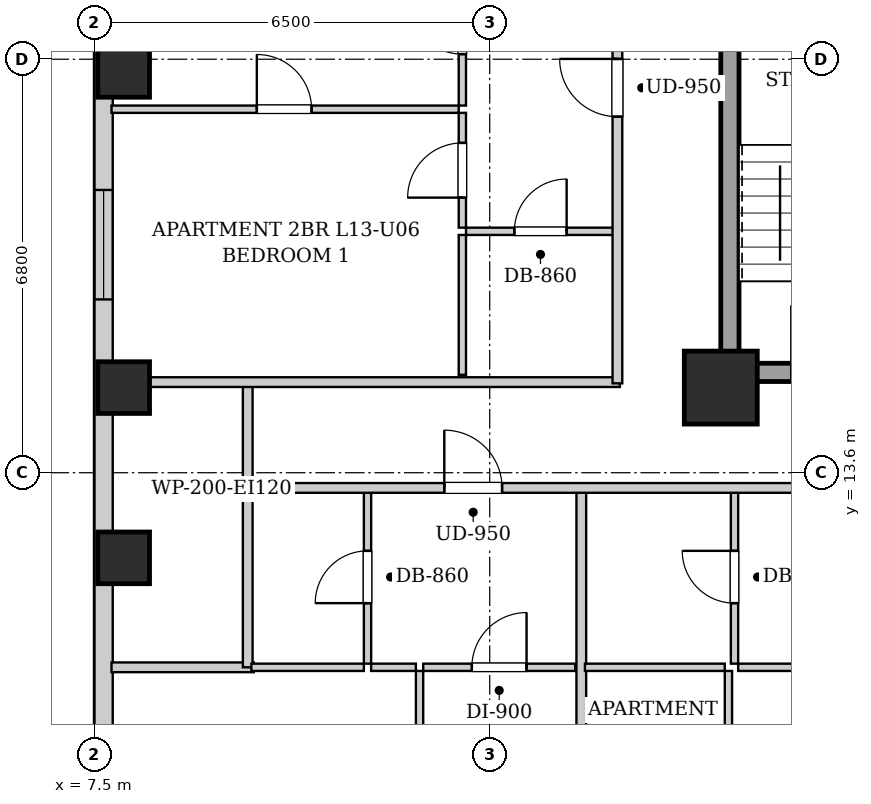
"""IFC4 building model, lengths in metres.
Left out: names, types, materials, properties, quantities, classifications, styles, units other than length and angle.
Written with IfcOpenShell. Run it as: python <this file> out.ifc"""

import sys

from ifc_helpers import new_model, si_unit, direction, frame, frame_2d, origin, origin_2d, place, context, subcontext, project, spatial, rectangle, extrude, element, fill, save


model = new_model("IFC4")
c1 = context("Model", 3, precision=1e-05, world=origin(), true_north=direction((0.0, 1.0)))
c2 = subcontext(c1, "Body", "Model", "MODEL_VIEW")
j1 = project(units=[si_unit("LENGTHUNIT", "METRE"), si_unit("PLANEANGLEUNIT", "RADIAN")], contexts=[c1])
p1 = place(None, origin())
s1 = spatial("IfcSite", under=j1, at=p1, CompositionType="ELEMENT")
p2 = place(p1, origin())
s2 = spatial("IfcBuilding", under=s1, at=p2, CompositionType="ELEMENT")
p3 = place(p2, frame((0.0, 0.0, 51.4)))
s3 = spatial("IfcBuildingStorey", under=s2, at=p3, CompositionType="ELEMENT", Elevation=51.4)
for number, where, z_axis, x_axis in (
    (1, (7.98, 12.2, 0.0), (0.0, 0.0, 1.0), (1.0, 0.0, 0.0)),
    (2, (7.98, 15.0, 0.0), (0.0, 0.0, 1.0), (1.0, 0.0, 0.0)),
    (3, (7.98, 20.2, 0.0), (0.0, 0.0, 1.0), (1.0, 0.0, 0.0)),
):
    element("IfcColumn", number, at=place(p3, frame(where, z_axis=z_axis, x_axis=x_axis)), inside=s3, PredefinedType="COLUMN", context=c2, shape_type="SweptSolid", body=[
        extrude(rectangle(XDim=0.85, YDim=0.85, at=origin_2d()), origin(), (0.0, 0.0, 1.0), 3.2),
    ])
p4 = place(p3, frame((17.8, 15.0, 0.0), z_axis=(0.0, 0.0, 1.0), x_axis=(1.0, 0.0, 0.0)))
e4 = element("IfcColumn", 4, at=p4, inside=s3, PredefinedType="COLUMN", context=c2, shape_type="SweptSolid", body=[
    extrude(rectangle(XDim=1.2, YDim=1.2, at=origin_2d()), origin(), (0.0, 0.0, 1.0), 3.2),
])
p5 = place(p3, frame((7.65, 2.5, 0.0), z_axis=(0.0, 0.0, 1.0), x_axis=(0.0, 1.0, 0.0)))
e5 = element("IfcWall", 5, at=p5, inside=s3, PredefinedType="SOLIDWALL", context=c2, shape_type="SweptSolid", body=[
    extrude(rectangle(XDim=42.6, YDim=0.3, at=frame_2d((21.3, 0.0))), origin(), (0.0, 0.0, 1.0), 1.975),
])
p6 = place(p5, frame((3.15, 0.0, 0.55)))
e6 = element("IfcOpeningElement", 6, at=p6, cuts=e5, PredefinedType="OPENING", context=c2, shape_type="SweptSolid", body=[
    extrude(rectangle(XDim=1.8, YDim=1.2, at=frame_2d((0.9, 0.6))), frame((0.0, 0.16, 0.0), z_axis=(0.0, -1.0, 0.0), x_axis=(1.0, 0.0, 0.0)), (0.0, 0.0, 1.0), 0.32),
])
p7 = place(p5, frame((1.185, 0.0, 0.55)))
e7 = element("IfcOpeningElement", 7, at=p7, cuts=e5, PredefinedType="OPENING", context=c2, shape_type="SweptSolid", body=[
    extrude(rectangle(XDim=1.35, YDim=1.2, at=frame_2d((0.675, 0.6))), frame((0.0, 0.16, 0.0), z_axis=(0.0, -1.0, 0.0), x_axis=(1.0, 0.0, 0.0)), (0.0, 0.0, 1.0), 0.32),
])
p8 = place(p5, frame((37.085, 0.0, 0.55)))
e8 = element("IfcOpeningElement", 8, at=p8, cuts=e5, PredefinedType="OPENING", context=c2, shape_type="SweptSolid", body=[
    extrude(rectangle(XDim=1.8, YDim=1.2, at=frame_2d((0.9, 0.6))), frame((0.0, 0.16, 0.0), z_axis=(0.0, -1.0, 0.0), x_axis=(1.0, 0.0, 0.0)), (0.0, 0.0, 1.0), 0.32),
])
p9 = place(p5, frame((31.55, 0.0, 0.55)))
e9 = element("IfcOpeningElement", 9, at=p9, cuts=e5, PredefinedType="OPENING", context=c2, shape_type="SweptSolid", body=[
    extrude(rectangle(XDim=1.35, YDim=1.2, at=frame_2d((0.675, 0.6))), frame((0.0, 0.16, 0.0), z_axis=(0.0, -1.0, 0.0), x_axis=(1.0, 0.0, 0.0)), (0.0, 0.0, 1.0), 0.32),
])
p10 = place(p5, frame((13.95, 0.0, 0.55)))
e10 = element("IfcOpeningElement", 10, at=p10, cuts=e5, PredefinedType="OPENING", context=c2, shape_type="SweptSolid", body=[
    extrude(rectangle(XDim=1.8, YDim=1.2, at=frame_2d((0.9, 0.6))), frame((0.0, 0.16, 0.0), z_axis=(0.0, -1.0, 0.0), x_axis=(1.0, 0.0, 0.0)), (0.0, 0.0, 1.0), 0.32),
])
p11 = place(p5, frame((23.325, 0.0, 0.55)))
e11 = element("IfcOpeningElement", 11, at=p11, cuts=e5, PredefinedType="OPENING", context=c2, shape_type="SweptSolid", body=[
    extrude(rectangle(XDim=1.8, YDim=1.2, at=frame_2d((0.9, 0.6))), frame((0.0, 0.16, 0.0), z_axis=(0.0, -1.0, 0.0), x_axis=(1.0, 0.0, 0.0)), (0.0, 0.0, 1.0), 0.32),
])
p12 = place(p3, frame((17.95, 15.1, 0.0), z_axis=(0.0, 0.0, 1.0), x_axis=(0.0, 1.0, 0.0)))
e12 = element("IfcWall", 12, at=p12, inside=s3, PredefinedType="SHEAR", context=c2, shape_type="SweptSolid", body=[
    extrude(rectangle(XDim=9.0, YDim=0.3, at=frame_2d((4.5, 0.0))), origin(), (0.0, 0.0, 1.0), 2.94),
])
p13 = place(p3, frame((18.1, 15.25, 0.0), z_axis=(0.0, 0.0, 1.0), x_axis=(1.0, 0.0, 0.0)))
e13 = element("IfcWall", 13, at=p13, inside=s3, PredefinedType="SHEAR", context=c2, shape_type="SweptSolid", body=[
    extrude(rectangle(XDim=2.85, YDim=0.3, at=frame_2d((1.425, 0.0))), origin(), (0.0, 0.0, 1.0), 2.94),
])
p14 = place(p13, frame((0.86, 0.0, 0.0)))
e14 = element("IfcOpeningElement", 14, at=p14, cuts=e13, PredefinedType="OPENING", context=c2, shape_type="SweptSolid", body=[
    extrude(rectangle(XDim=1.1, YDim=2.05, at=frame_2d((0.55, 1.025))), frame((0.0, 0.16, 0.0), z_axis=(0.0, -1.0, 0.0), x_axis=(1.0, 0.0, 0.0)), (0.0, 0.0, 1.0), 0.32),
])
p15 = place(p3, frame((10.02, 13.35, 0.0), z_axis=(0.0, 0.0, 1.0), x_axis=(0.0, 1.0, 0.0)))
e15 = element("IfcWall", 15, at=p15, inside=s3, PredefinedType="PARTITIONING", context=c2, shape_type="SweptSolid", body=[
    extrude(rectangle(XDim=1.74, YDim=0.16, at=frame_2d((0.87, 0.0))), origin(), (0.0, 0.0, 1.0), 2.94),
])
p16 = place(p3, frame((7.78, 15.09, 0.0), z_axis=(0.0, 0.0, 1.0), x_axis=(1.0, 0.0, 0.0)))
e16 = element("IfcWall", 16, at=p16, inside=s3, PredefinedType="PARTITIONING", context=c2, shape_type="SweptSolid", body=[
    extrude(rectangle(XDim=8.36, YDim=0.16, at=frame_2d((4.18, 0.0))), origin(), (0.0, 0.0, 1.0), 2.232),
])
p17 = place(p3, frame((7.78, 10.4, 0.0), z_axis=(0.0, 0.0, 1.0), x_axis=(1.0, 0.0, 0.0)))
e17 = element("IfcWall", 17, at=p17, inside=s3, PredefinedType="PARTITIONING", context=c2, shape_type="SweptSolid", body=[
    extrude(rectangle(XDim=2.34, YDim=0.16, at=frame_2d((1.17, 0.0))), origin(), (0.0, 0.0, 1.0), 2.94),
])
p18 = place(p3, frame((10.02, 10.4, 0.0), z_axis=(0.0, 0.0, 1.0), x_axis=(0.0, 1.0, 0.0)))
e18 = element("IfcWall", 18, at=p18, inside=s3, PredefinedType="PARTITIONING", context=c2, shape_type="SweptSolid", body=[
    extrude(rectangle(XDim=2.91, YDim=0.16, at=frame_2d((1.455, 0.0))), origin(), (0.0, 0.0, 1.0), 2.94),
])
p19 = place(p3, frame((11.99, 10.46, 0.0), z_axis=(0.0, 0.0, 1.0), x_axis=(0.0, 1.0, 0.0)))
e19 = element("IfcWall", 19, at=p19, inside=s3, PredefinedType="PARTITIONING", context=c2, shape_type="SweptSolid", body=[
    extrude(rectangle(XDim=2.85, YDim=0.12, at=frame_2d((1.425, 0.0))), origin(), (0.0, 0.0, 1.0), 2.94),
])
p20 = place(p19, frame((0.995, 0.0, 0.0)))
e20 = element("IfcOpeningElement", 20, at=p20, cuts=e19, PredefinedType="OPENING", context=c2, shape_type="SweptSolid", body=[
    extrude(rectangle(XDim=0.86, YDim=2.05, at=frame_2d((0.43, 1.025))), frame((0.0, 0.07, 0.0), z_axis=(0.0, -1.0, 0.0), x_axis=(1.0, 0.0, 0.0)), (0.0, 0.0, 1.0), 0.14),
])
p21 = place(p3, frame((10.08, 10.4, 0.0), z_axis=(0.0, 0.0, 1.0), x_axis=(1.0, 0.0, 0.0)))
e21 = element("IfcWall", 21, at=p21, inside=s3, PredefinedType="PARTITIONING", context=c2, shape_type="SweptSolid", body=[
    extrude(rectangle(XDim=1.85, YDim=0.12, at=frame_2d((0.925, 0.0))), origin(), (0.0, 0.0, 1.0), 2.94),
])
p22 = place(p3, frame((12.05, 10.4, 0.0), z_axis=(0.0, 0.0, 1.0), x_axis=(1.0, 0.0, 0.0)))
e22 = element("IfcWall", 22, at=p22, inside=s3, PredefinedType="PARTITIONING", context=c2, shape_type="SweptSolid", body=[
    extrude(rectangle(XDim=0.736, YDim=0.12, at=frame_2d((0.368, 0.0))), origin(), (0.0, 0.0, 1.0), 2.94),
])
p23 = place(p3, frame((12.906, 10.4, 0.0), z_axis=(0.0, 0.0, 1.0), x_axis=(1.0, 0.0, 0.0)))
e23 = element("IfcWall", 23, at=p23, inside=s3, PredefinedType="PARTITIONING", context=c2, shape_type="SweptSolid", body=[
    extrude(rectangle(XDim=2.5, YDim=0.12, at=frame_2d((1.25, 0.0))), origin(), (0.0, 0.0, 1.0), 2.94),
])
p24 = place(p23, frame((0.8, 0.0, 0.0)))
e24 = element("IfcOpeningElement", 24, at=p24, cuts=e23, PredefinedType="OPENING", context=c2, shape_type="SweptSolid", body=[
    extrude(rectangle(XDim=0.9, YDim=2.05, at=frame_2d((0.45, 1.025))), frame((0.0, 0.07, 0.0), z_axis=(0.0, -1.0, 0.0), x_axis=(1.0, 0.0, 0.0)), (0.0, 0.0, 1.0), 0.14),
])
p25 = place(p3, frame((12.846, 0.28, 0.0), z_axis=(0.0, 0.0, 1.0), x_axis=(0.0, 1.0, 0.0)))
e25 = element("IfcWall", 25, at=p25, inside=s3, PredefinedType="PARTITIONING", context=c2, shape_type="SweptSolid", body=[
    extrude(rectangle(XDim=10.06, YDim=0.12, at=frame_2d((5.03, 0.0))), origin(), (0.0, 0.0, 1.0), 2.94),
])
p26 = place(p25, frame((4.565, 0.0, 0.0)))
e26 = element("IfcOpeningElement", 26, at=p26, cuts=e25, PredefinedType="OPENING", context=c2, shape_type="SweptSolid", body=[
    extrude(rectangle(XDim=0.9, YDim=2.05, at=frame_2d((0.45, 1.025))), frame((0.0, 0.07, 0.0), z_axis=(0.0, -1.0, 0.0), x_axis=(1.0, 0.0, 0.0)), (0.0, 0.0, 1.0), 0.14),
])
p27 = place(p3, frame((15.506, 2.26, 0.0), z_axis=(0.0, 0.0, 1.0), x_axis=(0.0, 1.0, 0.0)))
e27 = element("IfcWall", 27, at=p27, inside=s3, PredefinedType="PARTITIONING", context=c2, shape_type="SweptSolid", body=[
    extrude(rectangle(XDim=11.05, YDim=0.16, at=frame_2d((5.525, 0.0))), origin(), (0.0, 0.0, 1.0), 2.94),
])
p28 = place(p3, frame((18.026, 10.46, 0.0), z_axis=(0.0, 0.0, 1.0), x_axis=(0.0, 1.0, 0.0)))
e28 = element("IfcWall", 28, at=p28, inside=s3, PredefinedType="PARTITIONING", context=c2, shape_type="SweptSolid", body=[
    extrude(rectangle(XDim=2.85, YDim=0.12, at=frame_2d((1.425, 0.0))), origin(), (0.0, 0.0, 1.0), 2.94),
])
p29 = place(p28, frame((0.995, 0.0, 0.0)))
e29 = element("IfcOpeningElement", 29, at=p29, cuts=e28, PredefinedType="OPENING", context=c2, shape_type="SweptSolid", body=[
    extrude(rectangle(XDim=0.86, YDim=2.05, at=frame_2d((0.43, 1.025))), frame((0.0, 0.07, 0.0), z_axis=(0.0, -1.0, 0.0), x_axis=(1.0, 0.0, 0.0)), (0.0, 0.0, 1.0), 0.14),
])
p30 = place(p3, frame((15.566, 10.4, 0.0), z_axis=(0.0, 0.0, 1.0), x_axis=(1.0, 0.0, 0.0)))
e30 = element("IfcWall", 30, at=p30, inside=s3, PredefinedType="PARTITIONING", context=c2, shape_type="SweptSolid", body=[
    extrude(rectangle(XDim=2.3, YDim=0.12, at=frame_2d((1.15, 0.0))), origin(), (0.0, 0.0, 1.0), 2.94),
])
p31 = place(p3, frame((18.086, 10.4, 0.0), z_axis=(0.0, 0.0, 1.0), x_axis=(1.0, 0.0, 0.0)))
e31 = element("IfcWall", 31, at=p31, inside=s3, PredefinedType="PARTITIONING", context=c2, shape_type="SweptSolid", body=[
    extrude(rectangle(XDim=4.44, YDim=0.12, at=frame_2d((2.22, 0.0))), origin(), (0.0, 0.0, 1.0), 2.94),
])
p32 = place(p31, frame((1.77, 0.0, 0.0)))
e32 = element("IfcOpeningElement", 32, at=p32, cuts=e31, PredefinedType="OPENING", context=c2, shape_type="SweptSolid", body=[
    extrude(rectangle(XDim=0.9, YDim=2.05, at=frame_2d((0.45, 1.025))), frame((0.0, 0.07, 0.0), z_axis=(0.0, -1.0, 0.0), x_axis=(1.0, 0.0, 0.0)), (0.0, 0.0, 1.0), 0.14),
])
p33 = place(p3, frame((17.926, 2.43, 0.0), z_axis=(0.0, 0.0, 1.0), x_axis=(0.0, 1.0, 0.0)))
e33 = element("IfcWall", 33, at=p33, inside=s3, PredefinedType="PARTITIONING", context=c2, shape_type="SweptSolid", body=[
    extrude(rectangle(XDim=7.91, YDim=0.12, at=frame_2d((3.955, 0.0))), origin(), (0.0, 0.0, 1.0), 2.232),
])
p34 = place(p33, frame((3.505, 0.0, 0.0)))
e34 = element("IfcOpeningElement", 34, at=p34, cuts=e33, PredefinedType="OPENING", context=c2, shape_type="SweptSolid", body=[
    extrude(rectangle(XDim=0.9, YDim=2.05, at=frame_2d((0.45, 1.025))), frame((0.0, 0.07, 0.0), z_axis=(0.0, -1.0, 0.0), x_axis=(1.0, 0.0, 0.0)), (0.0, 0.0, 1.0), 0.14),
])
p35 = place(p3, frame((13.61, 17.57, 0.0), z_axis=(0.0, 0.0, 1.0), x_axis=(1.0, 0.0, 0.0)))
e35 = element("IfcWall", 35, at=p35, inside=s3, PredefinedType="PARTITIONING", context=c2, shape_type="SweptSolid", body=[
    extrude(rectangle(XDim=2.45, YDim=0.12, at=frame_2d((1.225, 0.0))), origin(), (0.0, 0.0, 1.0), 2.94),
])
p36 = place(p35, frame((0.795, 0.0, 0.0)))
e36 = element("IfcOpeningElement", 36, at=p36, cuts=e35, PredefinedType="OPENING", context=c2, shape_type="SweptSolid", body=[
    extrude(rectangle(XDim=0.86, YDim=2.05, at=frame_2d((0.43, 1.025))), frame((0.0, 0.07, 0.0), z_axis=(0.0, -1.0, 0.0), x_axis=(1.0, 0.0, 0.0)), (0.0, 0.0, 1.0), 0.14),
])
p37 = place(p3, frame((13.55, 15.21, 0.0), z_axis=(0.0, 0.0, 1.0), x_axis=(0.0, 1.0, 0.0)))
e37 = element("IfcWall", 37, at=p37, inside=s3, PredefinedType="PARTITIONING", context=c2, shape_type="SweptSolid", body=[
    extrude(rectangle(XDim=2.3, YDim=0.12, at=frame_2d((1.15, 0.0))), origin(), (0.0, 0.0, 1.0), 2.94),
])
p38 = place(p3, frame((13.55, 17.63, 0.0), z_axis=(0.0, 0.0, 1.0), x_axis=(0.0, 1.0, 0.0)))
e38 = element("IfcWall", 38, at=p38, inside=s3, PredefinedType="PARTITIONING", context=c2, shape_type="SweptSolid", body=[
    extrude(rectangle(XDim=1.888, YDim=0.12, at=frame_2d((0.944, 0.0))), origin(), (0.0, 0.0, 1.0), 2.94),
])
p39 = place(p38, frame((0.494, 0.0, 0.0)))
e39 = element("IfcOpeningElement", 39, at=p39, cuts=e38, PredefinedType="OPENING", context=c2, shape_type="SweptSolid", body=[
    extrude(rectangle(XDim=0.9, YDim=2.05, at=frame_2d((0.45, 1.025))), frame((0.0, 0.07, 0.0), z_axis=(0.0, -1.0, 0.0), x_axis=(1.0, 0.0, 0.0)), (0.0, 0.0, 1.0), 0.14),
])
p40 = place(p3, frame((13.55, 19.638, 0.0), z_axis=(0.0, 0.0, 1.0), x_axis=(0.0, 1.0, 0.0)))
e40 = element("IfcWall", 40, at=p40, inside=s3, PredefinedType="PARTITIONING", context=c2, shape_type="SweptSolid", body=[
    extrude(rectangle(XDim=2.592, YDim=0.12, at=frame_2d((1.296, 0.0))), origin(), (0.0, 0.0, 1.0), 2.94),
])
p41 = place(p40, frame((0.846, 0.0, 0.0)))
e41 = element("IfcOpeningElement", 41, at=p41, cuts=e40, PredefinedType="OPENING", context=c2, shape_type="SweptSolid", body=[
    extrude(rectangle(XDim=0.9, YDim=2.05, at=frame_2d((0.45, 1.025))), frame((0.0, 0.07, 0.0), z_axis=(0.0, -1.0, 0.0), x_axis=(1.0, 0.0, 0.0)), (0.0, 0.0, 1.0), 0.14),
])
p42 = place(p3, frame((7.78, 19.578, 0.0), z_axis=(0.0, 0.0, 1.0), x_axis=(1.0, 0.0, 0.0)))
e42 = element("IfcWall", 42, at=p42, inside=s3, PredefinedType="PARTITIONING", context=c2, shape_type="SweptSolid", body=[
    extrude(rectangle(XDim=5.71, YDim=0.12, at=frame_2d((2.855, 0.0))), origin(), (0.0, 0.0, 1.0), 2.94),
])
p43 = place(p42, frame((2.39, 0.0, 0.0)))
e43 = element("IfcOpeningElement", 43, at=p43, cuts=e42, PredefinedType="OPENING", context=c2, shape_type="SweptSolid", body=[
    extrude(rectangle(XDim=0.9, YDim=2.05, at=frame_2d((0.45, 1.025))), frame((0.0, 0.07, 0.0), z_axis=(0.0, -1.0, 0.0), x_axis=(1.0, 0.0, 0.0)), (0.0, 0.0, 1.0), 0.14),
])
p44 = place(p3, frame((10.05, 13.35, 0.0), z_axis=(0.0, 0.0, 1.0), x_axis=(1.0, 0.0, 0.0)))
e44 = element("IfcWall", 44, at=p44, inside=s3, PredefinedType="PARTITIONING", context=c2, shape_type="SweptSolid", body=[
    extrude(rectangle(XDim=33.9, YDim=0.16, at=frame_2d((16.95, 0.0))), origin(), (0.0, 0.0, 1.0), 2.94),
])
p45 = place(p44, frame((3.203, 0.0, 0.0)))
e45 = element("IfcOpeningElement", 45, at=p45, cuts=e44, PredefinedType="OPENING", context=c2, shape_type="SweptSolid", body=[
    extrude(rectangle(XDim=0.95, YDim=2.1, at=frame_2d((0.475, 1.05))), frame((0.0, 0.09, 0.0), z_axis=(0.0, -1.0, 0.0), x_axis=(1.0, 0.0, 0.0)), (0.0, 0.0, 1.0), 0.18),
])
p46 = place(p44, frame((9.39, 0.0, 0.0)))
e46 = element("IfcOpeningElement", 46, at=p46, cuts=e44, PredefinedType="OPENING", context=c2, shape_type="SweptSolid", body=[
    extrude(rectangle(XDim=0.95, YDim=2.1, at=frame_2d((0.475, 1.05))), frame((0.0, 0.09, 0.0), z_axis=(0.0, -1.0, 0.0), x_axis=(1.0, 0.0, 0.0)), (0.0, 0.0, 1.0), 0.18),
])
p47 = place(p44, frame((28.476, 0.0, 0.0)))
e47 = element("IfcOpeningElement", 47, at=p47, cuts=e44, PredefinedType="OPENING", context=c2, shape_type="SweptSolid", body=[
    extrude(rectangle(XDim=0.95, YDim=2.1, at=frame_2d((0.475, 1.05))), frame((0.0, 0.09, 0.0), z_axis=(0.0, -1.0, 0.0), x_axis=(1.0, 0.0, 0.0)), (0.0, 0.0, 1.0), 0.18),
])
p48 = place(p3, frame((16.1, 15.07, 0.0), z_axis=(0.0, 0.0, 1.0), x_axis=(0.0, 1.0, 0.0)))
e48 = element("IfcWall", 48, at=p48, inside=s3, PredefinedType="PARTITIONING", context=c2, shape_type="SweptSolid", body=[
    extrude(rectangle(XDim=13.93, YDim=0.16, at=frame_2d((6.965, 0.0))), origin(), (0.0, 0.0, 1.0), 2.94),
])
p49 = place(p48, frame((4.385, 0.0, 0.0)))
e49 = element("IfcOpeningElement", 49, at=p49, cuts=e48, PredefinedType="OPENING", context=c2, shape_type="SweptSolid", body=[
    extrude(rectangle(XDim=0.95, YDim=2.1, at=frame_2d((0.475, 1.05))), frame((0.0, 0.09, 0.0), z_axis=(0.0, -1.0, 0.0), x_axis=(1.0, 0.0, 0.0)), (0.0, 0.0, 1.0), 0.18),
])
p50 = place(p14, origin())
e50 = element("IfcDoor", 50, at=p50, inside=s3, OperationType="SINGLE_SWING_LEFT", PredefinedType="DOOR", context=c2, shape_type="SweptSolid", body=[
    extrude(rectangle(XDim=1.1, YDim=2.05, at=frame_2d((0.55, 1.025))), frame((0.0, 0.025, 0.0), z_axis=(0.0, -1.0, 0.0), x_axis=(1.0, 0.0, 0.0)), (0.0, 0.0, 1.0), 0.05),
])
fill(e14, e50)
p51 = place(p20, origin())
e51 = element("IfcDoor", 51, at=p51, inside=s3, OperationType="SINGLE_SWING_LEFT", PredefinedType="DOOR", context=c2, shape_type="SweptSolid", body=[
    extrude(rectangle(XDim=0.86, YDim=2.05, at=frame_2d((0.43, 1.025))), frame((0.0, 0.025, 0.0), z_axis=(0.0, -1.0, 0.0), x_axis=(1.0, 0.0, 0.0)), (0.0, 0.0, 1.0), 0.05),
])
fill(e20, e51)
p52 = place(p24, origin())
e52 = element("IfcDoor", 52, at=p52, inside=s3, OperationType="SINGLE_SWING_RIGHT", PredefinedType="DOOR", context=c2, shape_type="SweptSolid", body=[
    extrude(rectangle(XDim=0.9, YDim=2.05, at=frame_2d((0.45, 1.025))), frame((0.0, 0.025, 0.0), z_axis=(0.0, -1.0, 0.0), x_axis=(1.0, 0.0, 0.0)), (0.0, 0.0, 1.0), 0.05),
])
fill(e24, e52)
p53 = place(p29, origin())
e53 = element("IfcDoor", 53, at=p53, inside=s3, OperationType="SINGLE_SWING_RIGHT", PredefinedType="DOOR", context=c2, shape_type="SweptSolid", body=[
    extrude(rectangle(XDim=0.86, YDim=2.05, at=frame_2d((0.43, 1.025))), frame((0.0, 0.025, 0.0), z_axis=(0.0, -1.0, 0.0), x_axis=(1.0, 0.0, 0.0)), (0.0, 0.0, 1.0), 0.05),
])
fill(e29, e53)
p54 = place(p36, origin())
e54 = element("IfcDoor", 54, at=p54, inside=s3, OperationType="SINGLE_SWING_RIGHT", PredefinedType="DOOR", context=c2, shape_type="SweptSolid", body=[
    extrude(rectangle(XDim=0.86, YDim=2.05, at=frame_2d((0.43, 1.025))), frame((0.0, 0.025, 0.0), z_axis=(0.0, -1.0, 0.0), x_axis=(1.0, 0.0, 0.0)), (0.0, 0.0, 1.0), 0.05),
])
fill(e36, e54)
p55 = place(p39, origin())
e55 = element("IfcDoor", 55, at=p55, inside=s3, OperationType="SINGLE_SWING_LEFT", PredefinedType="DOOR", context=c2, shape_type="SweptSolid", body=[
    extrude(rectangle(XDim=0.9, YDim=2.05, at=frame_2d((0.45, 1.025))), frame((0.0, 0.025, 0.0), z_axis=(0.0, -1.0, 0.0), x_axis=(1.0, 0.0, 0.0)), (0.0, 0.0, 1.0), 0.05),
])
fill(e39, e55)
p56 = place(p41, origin())
e56 = element("IfcDoor", 56, at=p56, inside=s3, OperationType="SINGLE_SWING_RIGHT", PredefinedType="DOOR", context=c2, shape_type="SweptSolid", body=[
    extrude(rectangle(XDim=0.9, YDim=2.05, at=frame_2d((0.45, 1.025))), frame((0.0, 0.025, 0.0), z_axis=(0.0, -1.0, 0.0), x_axis=(1.0, 0.0, 0.0)), (0.0, 0.0, 1.0), 0.05),
])
fill(e41, e56)
p57 = place(p43, origin())
e57 = element("IfcDoor", 57, at=p57, inside=s3, OperationType="SINGLE_SWING_LEFT", PredefinedType="DOOR", context=c2, shape_type="SweptSolid", body=[
    extrude(rectangle(XDim=0.9, YDim=2.05, at=frame_2d((0.45, 1.025))), frame((0.0, 0.025, 0.0), z_axis=(0.0, -1.0, 0.0), x_axis=(1.0, 0.0, 0.0)), (0.0, 0.0, 1.0), 0.05),
])
fill(e43, e57)
p58 = place(p45, origin())
e58 = element("IfcDoor", 58, at=p58, inside=s3, OperationType="SINGLE_SWING_LEFT", PredefinedType="DOOR", context=c2, shape_type="SweptSolid", body=[
    extrude(rectangle(XDim=0.95, YDim=2.1, at=frame_2d((0.475, 1.05))), frame((0.0, 0.025, 0.0), z_axis=(0.0, -1.0, 0.0), x_axis=(1.0, 0.0, 0.0)), (0.0, 0.0, 1.0), 0.05),
])
fill(e45, e58)
p59 = place(p49, origin())
e59 = element("IfcDoor", 59, at=p59, inside=s3, OperationType="SINGLE_SWING_RIGHT", PredefinedType="DOOR", context=c2, shape_type="SweptSolid", body=[
    extrude(rectangle(XDim=0.95, YDim=2.1, at=frame_2d((0.475, 1.05))), frame((0.0, 0.025, 0.0), z_axis=(0.0, -1.0, 0.0), x_axis=(1.0, 0.0, 0.0)), (0.0, 0.0, 1.0), 0.05),
])
fill(e49, e59)
p60 = place(p10, origin())
e60 = element("IfcWindow", 60, at=p60, inside=s3, PartitioningType="DOUBLE_PANEL_VERTICAL", PredefinedType="WINDOW", context=c2, shape_type="SweptSolid", body=[
    extrude(rectangle(XDim=1.8, YDim=1.2, at=frame_2d((0.9, 0.6))), frame((0.0, 0.03, 0.0), z_axis=(0.0, -1.0, 0.0), x_axis=(1.0, 0.0, 0.0)), (0.0, 0.0, 1.0), 0.06),
])
fill(e10, e60)
save(model, sys.argv[1])
